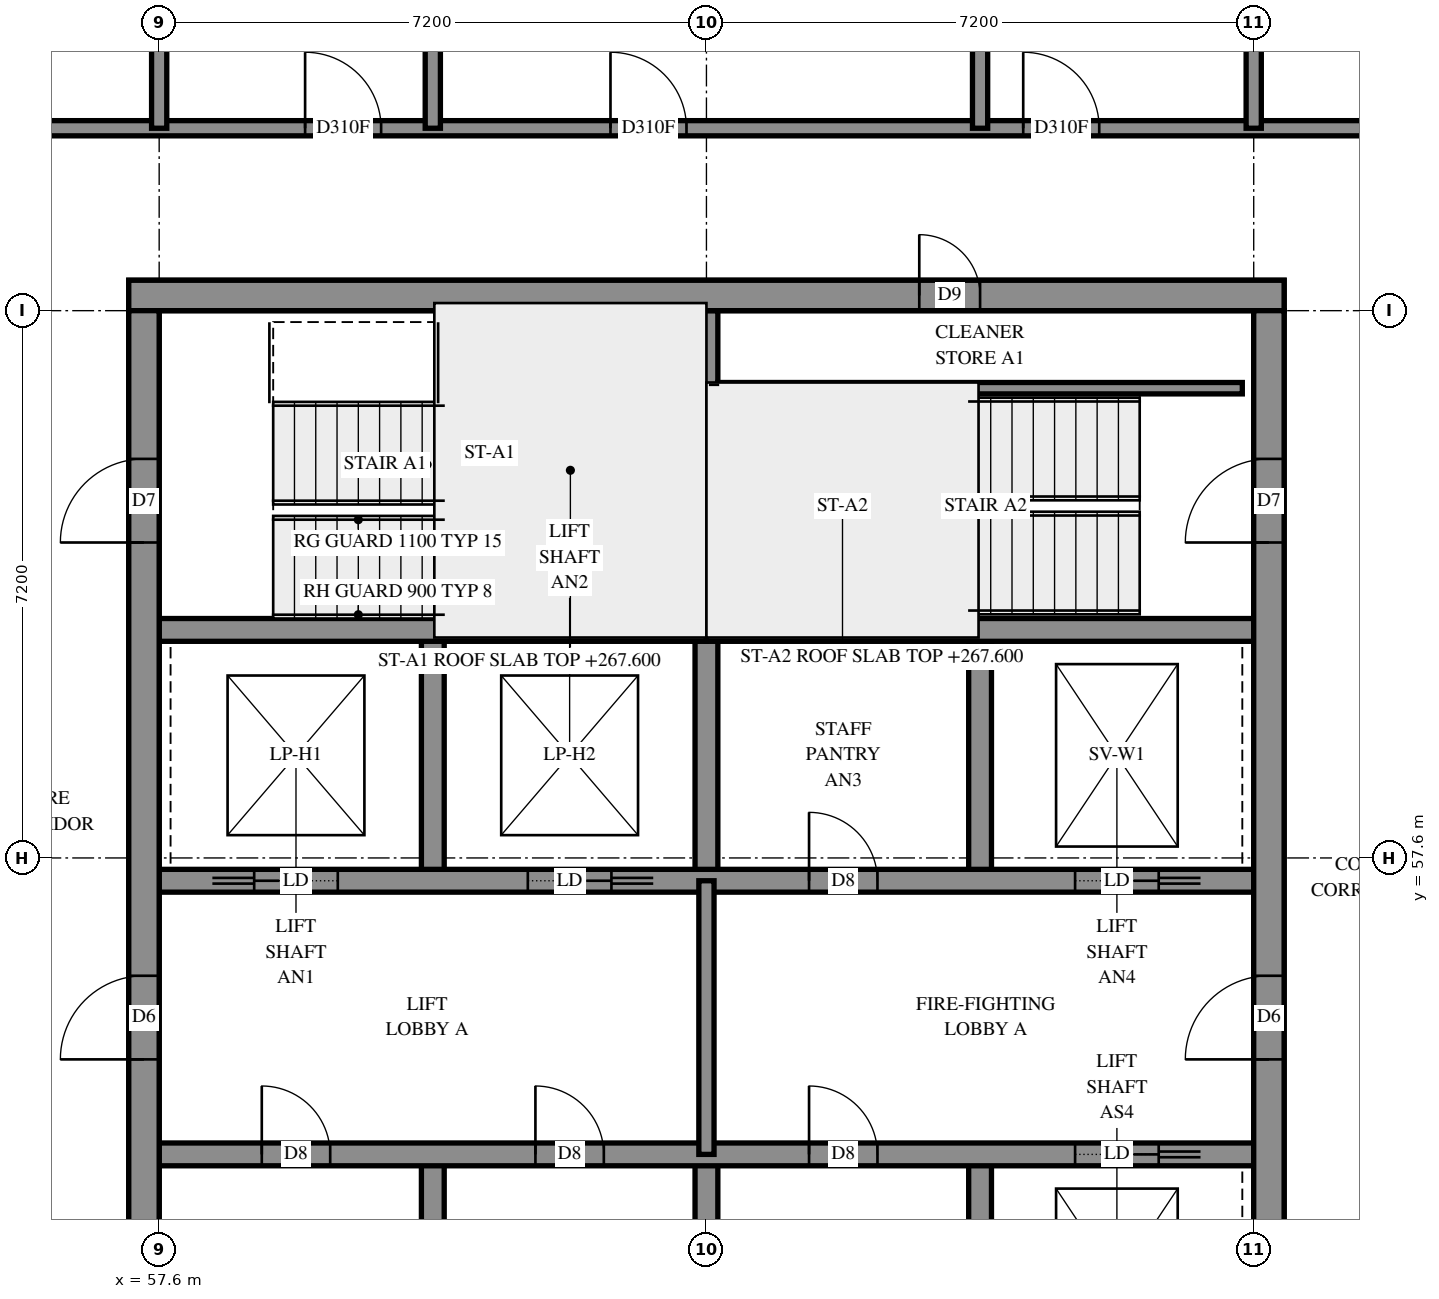
"""IFC4 building model, lengths in metres.
Left out: names, types, materials, properties, quantities, classifications, styles, units other than length and angle.
Written with IfcOpenShell. Run it as: python <this file> out.ifc"""

import sys

from ifc_helpers import new_model, si_unit, direction, frame, frame_2d, origin, place, context, subcontext, project, spatial, rectangle, extrude, element, fill, save


model = new_model("IFC4")
c1 = context("Model", 3, precision=1e-05, world=origin(), true_north=direction((0.0, 1.0)))
c2 = subcontext(c1, "Body", "Model", "MODEL_VIEW")
j1 = project(units=[si_unit("LENGTHUNIT", "METRE"), si_unit("PLANEANGLEUNIT", "RADIAN")], contexts=[c1])
p1 = place(None, origin())
s1 = spatial("IfcSite", under=j1, at=p1, CompositionType="ELEMENT")
p2 = place(p1, origin())
s2 = spatial("IfcBuilding", under=s1, at=p2, CompositionType="ELEMENT")
p3 = place(p2, frame((0.0, 0.0, 267.6)))
s3 = spatial("IfcBuildingStorey", under=s2, at=p3, CompositionType="ELEMENT", Elevation=267.6)
p4 = place(p3, frame((57.2, 65.0, -0.3), z_axis=(0.0, 0.0, 1.0), x_axis=(1.0, 0.0, 0.0)))
e1 = element("IfcWall", 1, at=p4, inside=s3, PredefinedType="SHEAR", context=c2, shape_type="SweptSolid", body=[
    extrude(rectangle(XDim=15.2, YDim=0.4, at=frame_2d((7.6, 0.0))), origin(), (0.0, 0.0, 1.0), 2.7),
])
p5 = place(p4, frame((10.4, 0.0, 0.3)))
e2 = element("IfcOpeningElement", 2, at=p5, cuts=e1, PredefinedType="OPENING", context=c2, shape_type="SweptSolid", body=[
    extrude(rectangle(XDim=0.8, YDim=2.1, at=frame_2d((0.4, 1.05))), frame((0.0, 0.21, 0.0), z_axis=(0.0, -1.0, 0.0), x_axis=(1.0, 0.0, 0.0)), (0.0, 0.0, 1.0), 0.42),
])
p6 = place(p3, frame((57.4, 50.4, -0.3), z_axis=(0.0, 0.0, 1.0), x_axis=(0.0, 1.0, 0.0)))
e3 = element("IfcWall", 3, at=p6, inside=s3, PredefinedType="SHEAR", context=c2, shape_type="SweptSolid", body=[
    extrude(rectangle(XDim=14.4, YDim=0.4, at=frame_2d((7.2, 0.0))), origin(), (0.0, 0.0, 1.0), 2.7),
])
p7 = place(p6, frame((4.55, 0.0, 0.3)))
e4 = element("IfcOpeningElement", 4, at=p7, cuts=e3, PredefinedType="OPENING", context=c2, shape_type="SweptSolid", body=[
    extrude(rectangle(XDim=1.1, YDim=2.1, at=frame_2d((0.55, 1.05))), frame((0.0, 0.21, 0.0), z_axis=(0.0, -1.0, 0.0), x_axis=(1.0, 0.0, 0.0)), (0.0, 0.0, 1.0), 0.42),
])
p8 = place(p6, frame((11.35, 0.0, 0.3)))
e5 = element("IfcOpeningElement", 5, at=p8, cuts=e3, PredefinedType="OPENING", context=c2, shape_type="SweptSolid", body=[
    extrude(rectangle(XDim=1.1, YDim=2.1, at=frame_2d((0.55, 1.05))), frame((0.0, 0.21, 0.0), z_axis=(0.0, -1.0, 0.0), x_axis=(1.0, 0.0, 0.0)), (0.0, 0.0, 1.0), 0.42),
])
p9 = place(p3, frame((72.2, 50.4, -0.3), z_axis=(0.0, 0.0, 1.0), x_axis=(0.0, 1.0, 0.0)))
e6 = element("IfcWall", 6, at=p9, inside=s3, PredefinedType="SHEAR", context=c2, shape_type="SweptSolid", body=[
    extrude(rectangle(XDim=14.4, YDim=0.4, at=frame_2d((7.2, 0.0))), origin(), (0.0, 0.0, 1.0), 2.7),
])
p10 = place(p9, frame((4.55, 0.0, 0.3)))
e7 = element("IfcOpeningElement", 7, at=p10, cuts=e6, PredefinedType="OPENING", context=c2, shape_type="SweptSolid", body=[
    extrude(rectangle(XDim=1.1, YDim=2.1, at=frame_2d((0.55, 1.05))), frame((0.0, 0.21, 0.0), z_axis=(0.0, -1.0, 0.0), x_axis=(1.0, 0.0, 0.0)), (0.0, 0.0, 1.0), 0.42),
])
p11 = place(p9, frame((11.35, 0.0, 0.3)))
e8 = element("IfcOpeningElement", 8, at=p11, cuts=e6, PredefinedType="OPENING", context=c2, shape_type="SweptSolid", body=[
    extrude(rectangle(XDim=1.1, YDim=2.1, at=frame_2d((0.55, 1.05))), frame((0.0, 0.21, 0.0), z_axis=(0.0, -1.0, 0.0), x_axis=(1.0, 0.0, 0.0)), (0.0, 0.0, 1.0), 0.42),
])
for number, where, z_axis, x_axis in (
    (9, (61.2, 50.4, 0.0), (0.0, 0.0, 1.0), (0.0, 1.0, 0.0)),
    (10, (61.2, 57.3, 0.0), (0.0, 0.0, 1.0), (0.0, 1.0, 0.0)),
    (11, (64.8, 50.4, 0.0), (0.0, 0.0, 1.0), (0.0, 1.0, 0.0)),
    (12, (64.8, 57.3, 0.0), (0.0, 0.0, 1.0), (0.0, 1.0, 0.0)),
    (13, (68.4, 50.4, 0.0), (0.0, 0.0, 1.0), (0.0, 1.0, 0.0)),
    (14, (68.4, 57.3, 0.0), (0.0, 0.0, 1.0), (0.0, 1.0, 0.0)),
):
    element("IfcWall", number, at=place(p3, frame(where, z_axis=z_axis, x_axis=x_axis)), inside=s3, PredefinedType="SOLIDWALL", context=c2, shape_type="SweptSolid", body=[
        extrude(rectangle(XDim=3.3, YDim=0.3, at=frame_2d((1.65, 0.0))), origin(), (0.0, 0.0, 1.0), 3.1),
    ])
p12 = place(p3, frame((57.6, 53.7, 0.0), z_axis=(0.0, 0.0, 1.0), x_axis=(1.0, 0.0, 0.0)))
e15 = element("IfcWall", 15, at=p12, inside=s3, PredefinedType="SOLIDWALL", context=c2, shape_type="SweptSolid", body=[
    extrude(rectangle(XDim=14.4, YDim=0.3, at=frame_2d((7.2, 0.0))), origin(), (0.0, 0.0, 1.0), 3.1),
])
p13 = place(p12, frame((1.35, 0.0, 0.0)))
e16 = element("IfcOpeningElement", 16, at=p13, cuts=e15, PredefinedType="OPENING", context=c2, shape_type="SweptSolid", body=[
    extrude(rectangle(XDim=0.9, YDim=2.1, at=frame_2d((0.45, 1.05))), frame((0.0, 0.16, 0.0), z_axis=(0.0, -1.0, 0.0), x_axis=(1.0, 0.0, 0.0)), (0.0, 0.0, 1.0), 0.32),
])
p14 = place(p12, frame((4.95, 0.0, 0.0)))
e17 = element("IfcOpeningElement", 17, at=p14, cuts=e15, PredefinedType="OPENING", context=c2, shape_type="SweptSolid", body=[
    extrude(rectangle(XDim=0.9, YDim=2.1, at=frame_2d((0.45, 1.05))), frame((0.0, 0.16, 0.0), z_axis=(0.0, -1.0, 0.0), x_axis=(1.0, 0.0, 0.0)), (0.0, 0.0, 1.0), 0.32),
])
p15 = place(p12, frame((8.55, 0.0, 0.0)))
e18 = element("IfcOpeningElement", 18, at=p15, cuts=e15, PredefinedType="OPENING", context=c2, shape_type="SweptSolid", body=[
    extrude(rectangle(XDim=0.9, YDim=2.1, at=frame_2d((0.45, 1.05))), frame((0.0, 0.16, 0.0), z_axis=(0.0, -1.0, 0.0), x_axis=(1.0, 0.0, 0.0)), (0.0, 0.0, 1.0), 0.32),
])
p16 = place(p12, frame((12.05, 0.0, 0.0)))
e19 = element("IfcOpeningElement", 19, at=p16, cuts=e15, PredefinedType="OPENING", context=c2, shape_type="SweptSolid", body=[
    extrude(rectangle(XDim=1.1, YDim=2.1, at=frame_2d((0.55, 1.05))), frame((0.0, 0.16, 0.0), z_axis=(0.0, -1.0, 0.0), x_axis=(1.0, 0.0, 0.0)), (0.0, 0.0, 1.0), 0.32),
])
p17 = place(p3, frame((57.6, 57.3, 0.0), z_axis=(0.0, 0.0, 1.0), x_axis=(1.0, 0.0, 0.0)))
e20 = element("IfcWall", 20, at=p17, inside=s3, PredefinedType="SOLIDWALL", context=c2, shape_type="SweptSolid", body=[
    extrude(rectangle(XDim=14.4, YDim=0.3, at=frame_2d((7.2, 0.0))), origin(), (0.0, 0.0, 1.0), 3.1),
])
p18 = place(p17, frame((8.55, 0.0, 0.0)))
e21 = element("IfcOpeningElement", 21, at=p18, cuts=e20, PredefinedType="OPENING", context=c2, shape_type="SweptSolid", body=[
    extrude(rectangle(XDim=0.9, YDim=2.1, at=frame_2d((0.45, 1.05))), frame((0.0, 0.16, 0.0), z_axis=(0.0, -1.0, 0.0), x_axis=(1.0, 0.0, 0.0)), (0.0, 0.0, 1.0), 0.32),
])
p19 = place(p17, frame((1.25, 0.0, 0.0)))
e22 = element("IfcOpeningElement", 22, at=p19, cuts=e20, PredefinedType="OPENING", context=c2, shape_type="SweptSolid", body=[
    extrude(rectangle(XDim=1.1, YDim=2.1, at=frame_2d((0.55, 1.05))), frame((0.0, 0.16, 0.0), z_axis=(0.0, -1.0, 0.0), x_axis=(1.0, 0.0, 0.0)), (0.0, 0.0, 1.0), 0.32),
])
p20 = place(p17, frame((4.85, 0.0, 0.0)))
e23 = element("IfcOpeningElement", 23, at=p20, cuts=e20, PredefinedType="OPENING", context=c2, shape_type="SweptSolid", body=[
    extrude(rectangle(XDim=1.1, YDim=2.1, at=frame_2d((0.55, 1.05))), frame((0.0, 0.16, 0.0), z_axis=(0.0, -1.0, 0.0), x_axis=(1.0, 0.0, 0.0)), (0.0, 0.0, 1.0), 0.32),
])
p21 = place(p17, frame((12.05, 0.0, 0.0)))
e24 = element("IfcOpeningElement", 24, at=p21, cuts=e20, PredefinedType="OPENING", context=c2, shape_type="SweptSolid", body=[
    extrude(rectangle(XDim=1.1, YDim=2.1, at=frame_2d((0.55, 1.05))), frame((0.0, 0.16, 0.0), z_axis=(0.0, -1.0, 0.0), x_axis=(1.0, 0.0, 0.0)), (0.0, 0.0, 1.0), 0.32),
])
for number, where, z_axis, x_axis in (
    (25, (57.6, 60.6, 0.0), (0.0, 0.0, 1.0), (1.0, 0.0, 0.0)),
    (26, (64.8, 60.6, 0.0), (0.0, 0.0, 1.0), (1.0, 0.0, 0.0)),
):
    element("IfcWall", number, at=place(p3, frame(where, z_axis=z_axis, x_axis=x_axis)), inside=s3, PredefinedType="SOLIDWALL", context=c2, shape_type="SweptSolid", body=[
        extrude(rectangle(XDim=7.2, YDim=0.3, at=frame_2d((3.6, 0.0))), origin(), (0.0, 0.0, 1.0), 3.1),
    ])
p22 = place(p3, frame((64.8, 60.6, 0.0), z_axis=(0.0, 0.0, 1.0), x_axis=(0.0, 1.0, 0.0)))
e27 = element("IfcWall", 27, at=p22, inside=s3, PredefinedType="SOLIDWALL", context=c2, shape_type="SweptSolid", body=[
    extrude(rectangle(XDim=4.2, YDim=0.3, at=frame_2d((2.1, 0.0))), origin(), (0.0, 0.0, 1.0), 3.1),
])
p23 = place(p3, frame((64.95, 63.78, 0.0), z_axis=(0.0, 0.0, 1.0), x_axis=(1.0, 0.0, 0.0)))
e28 = element("IfcWall", 28, at=p23, inside=s3, PredefinedType="PARTITIONING", context=c2, shape_type="SweptSolid", body=[
    extrude(rectangle(XDim=6.9, YDim=0.15, at=frame_2d((3.45, 0.0))), origin(), (0.0, 0.0, 1.0), 3.1),
])
p24 = place(p3, frame((64.8, 53.7, 0.0), z_axis=(0.0, 0.0, 1.0), x_axis=(0.0, 1.0, 0.0)))
e29 = element("IfcWall", 29, at=p24, inside=s3, PredefinedType="PARTITIONING", context=c2, shape_type="SweptSolid", body=[
    extrude(rectangle(XDim=3.6, YDim=0.2, at=frame_2d((1.8, 0.0))), origin(), (0.0, 0.0, 1.0), 3.1),
])
p25 = place(p3, frame((55.2, 67.2, 0.0), z_axis=(0.0, 0.0, 1.0), x_axis=(1.0, 0.0, 0.0)))
e30 = element("IfcWall", 30, at=p25, inside=s3, PredefinedType="PARTITIONING", context=c2, shape_type="SweptSolid", body=[
    extrude(rectangle(XDim=19.2, YDim=0.2, at=frame_2d((9.6, 0.0))), origin(), (0.0, 0.0, 1.0), 3.1),
])
p26 = place(p25, frame((4.32, 0.0, 0.0)))
e31 = element("IfcOpeningElement", 31, at=p26, cuts=e30, PredefinedType="OPENING", context=c2, shape_type="SweptSolid", body=[
    extrude(rectangle(XDim=1.0, YDim=2.1, at=frame_2d((0.5, 1.05))), frame((0.0, 0.11, 0.0), z_axis=(0.0, -1.0, 0.0), x_axis=(1.0, 0.0, 0.0)), (0.0, 0.0, 1.0), 0.22),
])
p27 = place(p25, frame((8.338, 0.0, 0.0)))
e32 = element("IfcOpeningElement", 32, at=p27, cuts=e30, PredefinedType="OPENING", context=c2, shape_type="SweptSolid", body=[
    extrude(rectangle(XDim=1.0, YDim=2.1, at=frame_2d((0.5, 1.05))), frame((0.0, 0.11, 0.0), z_axis=(0.0, -1.0, 0.0), x_axis=(1.0, 0.0, 0.0)), (0.0, 0.0, 1.0), 0.22),
])
p28 = place(p25, frame((13.768, 0.0, 0.0)))
e33 = element("IfcOpeningElement", 33, at=p28, cuts=e30, PredefinedType="OPENING", context=c2, shape_type="SweptSolid", body=[
    extrude(rectangle(XDim=1.0, YDim=2.1, at=frame_2d((0.5, 1.05))), frame((0.0, 0.11, 0.0), z_axis=(0.0, -1.0, 0.0), x_axis=(1.0, 0.0, 0.0)), (0.0, 0.0, 1.0), 0.22),
])
p29 = place(p3, frame((68.4, 67.2, 0.0), z_axis=(0.0, 0.0, 1.0), x_axis=(0.0, 1.0, 0.0)))
e34 = element("IfcWall", 34, at=p29, inside=s3, PredefinedType="PARTITIONING", context=c2, shape_type="SweptSolid", body=[
    extrude(rectangle(XDim=5.58, YDim=0.2, at=frame_2d((2.79, 0.0))), origin(), (0.0, 0.0, 1.0), 3.1),
])
p30 = place(p3, frame((61.2, 67.2, 0.0), z_axis=(0.0, 0.0, 1.0), x_axis=(0.0, 1.0, 0.0)))
e35 = element("IfcWall", 35, at=p30, inside=s3, PredefinedType="PARTITIONING", context=c2, shape_type="SweptSolid", body=[
    extrude(rectangle(XDim=5.574, YDim=0.2, at=frame_2d((2.787, 0.0))), origin(), (0.0, 0.0, 1.0), 3.1),
])
p31 = place(p3, frame((72.0, 67.2, 0.0), z_axis=(0.0, 0.0, 1.0), x_axis=(0.0, 1.0, 0.0)))
e36 = element("IfcWall", 36, at=p31, inside=s3, PredefinedType="PARTITIONING", context=c2, shape_type="SweptSolid", body=[
    extrude(rectangle(XDim=4.45, YDim=0.2, at=frame_2d((2.225, 0.0))), origin(), (0.0, 0.0, 1.0), 3.1),
])
p32 = place(p3, frame((57.6, 67.2, 0.0), z_axis=(0.0, 0.0, 1.0), x_axis=(0.0, 1.0, 0.0)))
e37 = element("IfcWall", 37, at=p32, inside=s3, PredefinedType="PARTITIONING", context=c2, shape_type="SweptSolid", body=[
    extrude(rectangle(XDim=4.346, YDim=0.2, at=frame_2d((2.173, 0.0))), origin(), (0.0, 0.0, 1.0), 3.1),
])
p33 = place(p5, origin())
e38 = element("IfcDoor", 38, at=p33, inside=s3, OperationType="SINGLE_SWING_RIGHT", PredefinedType="DOOR", context=c2, shape_type="SweptSolid", body=[
    extrude(rectangle(XDim=0.8, YDim=2.1, at=frame_2d((0.4, 1.05))), frame((0.0, 0.025, 0.0), z_axis=(0.0, -1.0, 0.0), x_axis=(1.0, 0.0, 0.0)), (0.0, 0.0, 1.0), 0.05),
])
fill(e2, e38)
p34 = place(p7, origin())
e39 = element("IfcDoor", 39, at=p34, inside=s3, OperationType="DOUBLE_DOOR_SINGLE_SWING", PredefinedType="DOOR", context=c2, shape_type="SweptSolid", body=[
    extrude(rectangle(XDim=1.1, YDim=2.1, at=frame_2d((0.55, 1.05))), frame((0.0, 0.025, 0.0), z_axis=(0.0, -1.0, 0.0), x_axis=(1.0, 0.0, 0.0)), (0.0, 0.0, 1.0), 0.05),
])
fill(e4, e39)
p35 = place(p10, origin())
e40 = element("IfcDoor", 40, at=p35, inside=s3, OperationType="DOUBLE_DOOR_SINGLE_SWING", PredefinedType="DOOR", context=c2, shape_type="SweptSolid", body=[
    extrude(rectangle(XDim=1.1, YDim=2.1, at=frame_2d((0.55, 1.05))), frame((0.0, 0.025, 0.0), z_axis=(0.0, -1.0, 0.0), x_axis=(1.0, 0.0, 0.0)), (0.0, 0.0, 1.0), 0.05),
])
fill(e7, e40)
p36 = place(p8, origin())
e41 = element("IfcDoor", 41, at=p36, inside=s3, OperationType="SINGLE_SWING_LEFT", PredefinedType="DOOR", context=c2, shape_type="SweptSolid", body=[
    extrude(rectangle(XDim=1.1, YDim=2.1, at=frame_2d((0.55, 1.05))), frame((0.0, 0.025, 0.0), z_axis=(0.0, -1.0, 0.0), x_axis=(1.0, 0.0, 0.0)), (0.0, 0.0, 1.0), 0.05),
])
fill(e5, e41)
p37 = place(p11, origin())
e42 = element("IfcDoor", 42, at=p37, inside=s3, OperationType="SINGLE_SWING_RIGHT", PredefinedType="DOOR", context=c2, shape_type="SweptSolid", body=[
    extrude(rectangle(XDim=1.1, YDim=2.1, at=frame_2d((0.55, 1.05))), frame((0.0, 0.025, 0.0), z_axis=(0.0, -1.0, 0.0), x_axis=(1.0, 0.0, 0.0)), (0.0, 0.0, 1.0), 0.05),
])
fill(e8, e42)
p38 = place(p13, origin())
e43 = element("IfcDoor", 43, at=p38, inside=s3, OperationType="SINGLE_SWING_LEFT", PredefinedType="DOOR", context=c2, shape_type="SweptSolid", body=[
    extrude(rectangle(XDim=0.9, YDim=2.1, at=frame_2d((0.45, 1.05))), frame((0.0, 0.025, 0.0), z_axis=(0.0, -1.0, 0.0), x_axis=(1.0, 0.0, 0.0)), (0.0, 0.0, 1.0), 0.05),
])
fill(e16, e43)
p39 = place(p14, origin())
e44 = element("IfcDoor", 44, at=p39, inside=s3, OperationType="SINGLE_SWING_LEFT", PredefinedType="DOOR", context=c2, shape_type="SweptSolid", body=[
    extrude(rectangle(XDim=0.9, YDim=2.1, at=frame_2d((0.45, 1.05))), frame((0.0, 0.025, 0.0), z_axis=(0.0, -1.0, 0.0), x_axis=(1.0, 0.0, 0.0)), (0.0, 0.0, 1.0), 0.05),
])
fill(e17, e44)
p40 = place(p15, origin())
e45 = element("IfcDoor", 45, at=p40, inside=s3, OperationType="SINGLE_SWING_LEFT", PredefinedType="DOOR", context=c2, shape_type="SweptSolid", body=[
    extrude(rectangle(XDim=0.9, YDim=2.1, at=frame_2d((0.45, 1.05))), frame((0.0, 0.025, 0.0), z_axis=(0.0, -1.0, 0.0), x_axis=(1.0, 0.0, 0.0)), (0.0, 0.0, 1.0), 0.05),
])
fill(e18, e45)
p41 = place(p18, origin())
e46 = element("IfcDoor", 46, at=p41, inside=s3, OperationType="SINGLE_SWING_LEFT", PredefinedType="DOOR", context=c2, shape_type="SweptSolid", body=[
    extrude(rectangle(XDim=0.9, YDim=2.1, at=frame_2d((0.45, 1.05))), frame((0.0, 0.025, 0.0), z_axis=(0.0, -1.0, 0.0), x_axis=(1.0, 0.0, 0.0)), (0.0, 0.0, 1.0), 0.05),
])
fill(e21, e46)
p42 = place(p16, origin())
e47 = element("IfcDoor", 47, at=p42, inside=s3, OperationType="SLIDING_TO_RIGHT", PredefinedType="DOOR", context=c2, shape_type="SweptSolid", body=[
    extrude(rectangle(XDim=1.1, YDim=2.1, at=frame_2d((0.55, 1.05))), frame((0.0, 0.025, 0.0), z_axis=(0.0, -1.0, 0.0), x_axis=(1.0, 0.0, 0.0)), (0.0, 0.0, 1.0), 0.05),
])
fill(e19, e47)
p43 = place(p19, origin())
e48 = element("IfcDoor", 48, at=p43, inside=s3, OperationType="SLIDING_TO_LEFT", PredefinedType="DOOR", context=c2, shape_type="SweptSolid", body=[
    extrude(rectangle(XDim=1.1, YDim=2.1, at=frame_2d((0.55, 1.05))), frame((0.0, 0.025, 0.0), z_axis=(0.0, -1.0, 0.0), x_axis=(1.0, 0.0, 0.0)), (0.0, 0.0, 1.0), 0.05),
])
fill(e22, e48)
p44 = place(p20, origin())
e49 = element("IfcDoor", 49, at=p44, inside=s3, OperationType="SLIDING_TO_RIGHT", PredefinedType="DOOR", context=c2, shape_type="SweptSolid", body=[
    extrude(rectangle(XDim=1.1, YDim=2.1, at=frame_2d((0.55, 1.05))), frame((0.0, 0.025, 0.0), z_axis=(0.0, -1.0, 0.0), x_axis=(1.0, 0.0, 0.0)), (0.0, 0.0, 1.0), 0.05),
])
fill(e23, e49)
p45 = place(p21, origin())
e50 = element("IfcDoor", 50, at=p45, inside=s3, OperationType="SLIDING_TO_RIGHT", PredefinedType="DOOR", context=c2, shape_type="SweptSolid", body=[
    extrude(rectangle(XDim=1.1, YDim=2.1, at=frame_2d((0.55, 1.05))), frame((0.0, 0.025, 0.0), z_axis=(0.0, -1.0, 0.0), x_axis=(1.0, 0.0, 0.0)), (0.0, 0.0, 1.0), 0.05),
])
fill(e24, e50)
p46 = place(p26, origin())
e51 = element("IfcDoor", 51, at=p46, inside=s3, OperationType="SINGLE_SWING_RIGHT", PredefinedType="DOOR", context=c2, shape_type="SweptSolid", body=[
    extrude(rectangle(XDim=1.0, YDim=2.1, at=frame_2d((0.5, 1.05))), frame((0.0, 0.025, 0.0), z_axis=(0.0, -1.0, 0.0), x_axis=(1.0, 0.0, 0.0)), (0.0, 0.0, 1.0), 0.05),
])
fill(e31, e51)
p47 = place(p27, origin())
e52 = element("IfcDoor", 52, at=p47, inside=s3, OperationType="SINGLE_SWING_LEFT", PredefinedType="DOOR", context=c2, shape_type="SweptSolid", body=[
    extrude(rectangle(XDim=1.0, YDim=2.1, at=frame_2d((0.5, 1.05))), frame((0.0, 0.025, 0.0), z_axis=(0.0, -1.0, 0.0), x_axis=(1.0, 0.0, 0.0)), (0.0, 0.0, 1.0), 0.05),
])
fill(e32, e52)
p48 = place(p28, origin())
e53 = element("IfcDoor", 53, at=p48, inside=s3, OperationType="SINGLE_SWING_LEFT", PredefinedType="DOOR", context=c2, shape_type="SweptSolid", body=[
    extrude(rectangle(XDim=1.0, YDim=2.1, at=frame_2d((0.5, 1.05))), frame((0.0, 0.025, 0.0), z_axis=(0.0, -1.0, 0.0), x_axis=(1.0, 0.0, 0.0)), (0.0, 0.0, 1.0), 0.05),
])
fill(e33, e53)
save(model, sys.argv[1])
